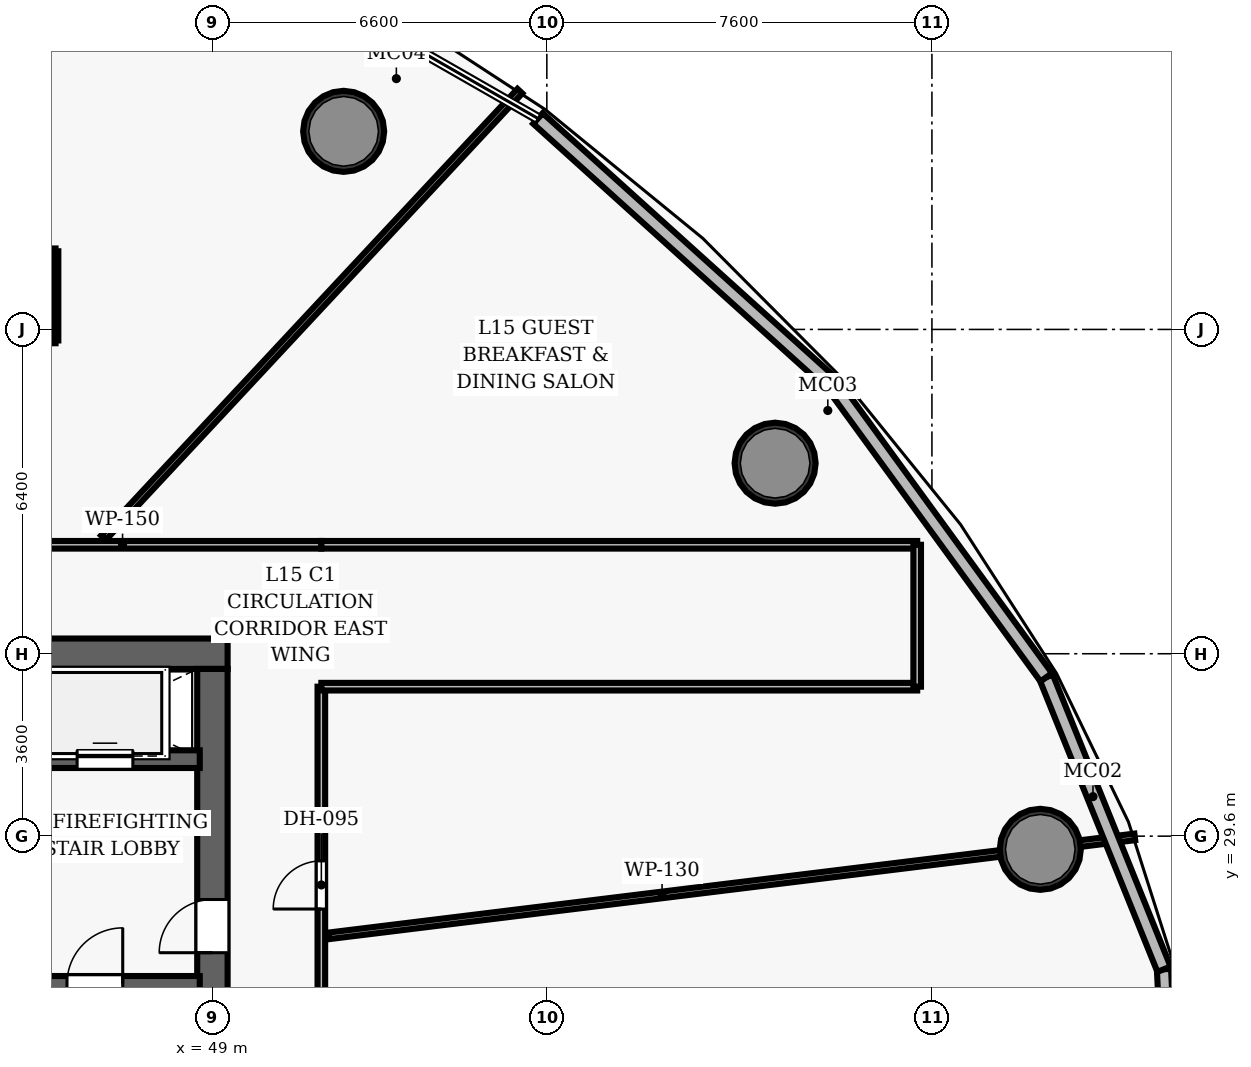
"""IFC4 building model, lengths in metres.
Left out: names, types, materials, properties, quantities, classifications, styles, units other than length and angle.
Written with IfcOpenShell. Run it as: python <this file> out.ifc"""

import sys

from ifc_helpers import new_model, si_unit, direction, frame, frame_2d, origin, origin_2d, place, context, subcontext, project, spatial, rectangle, hollow_circle, extrude, element, fill, save


model = new_model("IFC4")
c1 = context("Model", 3, precision=1e-05, world=origin(), true_north=direction((0.0, 1.0)))
c2 = subcontext(c1, "Body", "Model", "MODEL_VIEW")
j1 = project(units=[si_unit("LENGTHUNIT", "METRE"), si_unit("PLANEANGLEUNIT", "RADIAN")], contexts=[c1])
p1 = place(None, origin())
s1 = spatial("IfcSite", under=j1, at=p1, CompositionType="ELEMENT")
p2 = place(p1, origin())
s2 = spatial("IfcBuilding", under=s1, at=p2, CompositionType="ELEMENT")
p3 = place(p2, frame((0.0, 0.0, 69.4)))
s3 = spatial("IfcBuildingStorey", under=s2, at=p3, CompositionType="ELEMENT", Elevation=69.4)
p4 = place(p3, frame((26.7, 33.2, 0.0), z_axis=(0.0, 0.0, 1.0), x_axis=(1.0, 0.0, 0.0)))
e1 = element("IfcWall", 1, at=p4, inside=s3, PredefinedType="SHEAR", context=c2, shape_type="SweptSolid", body=[
    extrude(rectangle(XDim=22.6, YDim=0.6, at=frame_2d((11.3, 0.0))), origin(), (0.0, 0.0, 1.0), 3.5),
])
p5 = place(p4, frame((4.62, 0.0, 0.0)))
e2 = element("IfcOpeningElement", 2, at=p5, cuts=e1, PredefinedType="OPENING", context=c2, shape_type="SweptSolid", body=[
    extrude(rectangle(XDim=1.05, YDim=2.15, at=frame_2d((0.525, 1.075))), frame((0.0, 0.31, 0.0), z_axis=(0.0, -1.0, 0.0), x_axis=(1.0, 0.0, 0.0)), (0.0, 0.0, 1.0), 0.62),
])
p6 = place(p4, frame((14.52, 0.0, 0.0)))
e3 = element("IfcOpeningElement", 3, at=p6, cuts=e1, PredefinedType="OPENING", context=c2, shape_type="SweptSolid", body=[
    extrude(rectangle(XDim=1.05, YDim=2.15, at=frame_2d((0.525, 1.075))), frame((0.0, 0.31, 0.0), z_axis=(0.0, -1.0, 0.0), x_axis=(1.0, 0.0, 0.0)), (0.0, 0.0, 1.0), 0.62),
])
p7 = place(p3, frame((49.0, 19.1, 0.0), z_axis=(0.0, 0.0, 1.0), x_axis=(0.0, 1.0, 0.0)))
e4 = element("IfcWall", 4, at=p7, inside=s3, PredefinedType="SHEAR", context=c2, shape_type="SweptSolid", body=[
    extrude(rectangle(XDim=13.8, YDim=0.6, at=frame_2d((6.9, 0.0))), origin(), (0.0, 0.0, 1.0), 3.5),
])
p8 = place(p7, frame((8.2, 0.0, 0.0)))
e5 = element("IfcOpeningElement", 5, at=p8, cuts=e4, PredefinedType="OPENING", context=c2, shape_type="SweptSolid", body=[
    extrude(rectangle(XDim=1.05, YDim=2.15, at=frame_2d((0.525, 1.075))), frame((0.0, 0.31, 0.0), z_axis=(0.0, -1.0, 0.0), x_axis=(1.0, 0.0, 0.0)), (0.0, 0.0, 1.0), 0.62),
])
for number, where, z_axis, x_axis in (
    (6, (65.339, 29.34, 0.0), (0.0, 0.0, 1.0), (1.0, 0.0, 0.0)),
    (7, (60.105, 36.96, 0.0), (0.0, 0.0, 1.0), (1.0, 0.0, 0.0)),
    (8, (51.59, 43.509, 0.0), (0.0, 0.0, 1.0), (1.0, 0.0, 0.0)),
):
    element("IfcColumn", number, at=place(p3, frame(where, z_axis=z_axis, x_axis=x_axis)), inside=s3, PredefinedType="COLUMN", context=c2, shape_type="SweptSolid", body=[
        extrude(hollow_circle(Radius=0.8, WallThickness=0.06, at=origin_2d()), origin(), (0.0, 0.0, 1.0), 3.5),
    ])
p9 = place(p3, frame((45.08, 26.69, 0.0), z_axis=(0.0, 0.0, 1.0), x_axis=(1.0, 0.0, 0.0)))
e9 = element("IfcWall", 9, at=p9, inside=s3, PredefinedType="SHEAR", context=c2, shape_type="SweptSolid", body=[
    extrude(rectangle(XDim=3.67, YDim=0.3, at=frame_2d((1.835, 0.0))), origin(), (0.0, 0.0, 1.0), 3.5),
])
p10 = place(p9, frame((1.05, 0.0, 0.0)))
e10 = element("IfcOpeningElement", 10, at=p10, cuts=e9, PredefinedType="OPENING", context=c2, shape_type="SweptSolid", body=[
    extrude(rectangle(XDim=1.1, YDim=2.15, at=frame_2d((0.55, 1.075))), frame((0.0, 0.16, 0.0), z_axis=(0.0, -1.0, 0.0), x_axis=(1.0, 0.0, 0.0)), (0.0, 0.0, 1.0), 0.32),
])
p11 = place(p3, frame((45.08, 31.12, 0.0), z_axis=(0.0, 0.0, 1.0), x_axis=(1.0, 0.0, 0.0)))
e11 = element("IfcWall", 11, at=p11, inside=s3, PredefinedType="SHEAR", context=c2, shape_type="SweptSolid", body=[
    extrude(rectangle(XDim=3.67, YDim=0.35, at=frame_2d((1.835, 0.0))), origin(), (0.0, 0.0, 1.0), 2.6),
])
p12 = place(p11, frame((1.25, 0.0, 0.0)))
e12 = element("IfcOpeningElement", 12, at=p12, cuts=e11, PredefinedType="OPENING", context=c2, shape_type="SweptSolid", body=[
    extrude(rectangle(XDim=1.1, YDim=2.15, at=frame_2d((0.55, 1.075))), frame((0.0, 0.185, 0.0), z_axis=(0.0, -1.0, 0.0), x_axis=(1.0, 0.0, 0.0)), (0.0, 0.0, 1.0), 0.37),
])
p13 = place(p3, frame((27.65, 35.35, 0.0), z_axis=(0.0, 0.0, 1.0), x_axis=(1.0, 0.0, 0.0)))
e13 = element("IfcWall", 13, at=p13, inside=s3, PredefinedType="PARTITIONING", context=c2, shape_type="SweptSolid", body=[
    extrude(rectangle(XDim=23.5, YDim=0.15, at=frame_2d((11.75, 0.0))), origin(), (0.0, 0.0, 1.0), 2.6),
])
p14 = place(p13, frame((14.553, 0.0, 0.0)))
e14 = element("IfcOpeningElement", 14, at=p14, cuts=e13, PredefinedType="OPENING", context=c2, shape_type="SweptSolid", body=[
    extrude(rectangle(XDim=0.95, YDim=2.15, at=frame_2d((0.475, 1.075))), frame((0.0, 0.085, 0.0), z_axis=(0.0, -1.0, 0.0), x_axis=(1.0, 0.0, 0.0)), (0.0, 0.0, 1.0), 0.17),
])
p15 = place(p13, frame((7.784, 0.0, 0.0)))
e15 = element("IfcOpeningElement", 15, at=p15, cuts=e13, PredefinedType="OPENING", context=c2, shape_type="SweptSolid", body=[
    extrude(rectangle(XDim=0.95, YDim=2.15, at=frame_2d((0.475, 1.075))), frame((0.0, 0.085, 0.0), z_axis=(0.0, -1.0, 0.0), x_axis=(1.0, 0.0, 0.0)), (0.0, 0.0, 1.0), 0.17),
])
p16 = place(p3, frame((51.15, 16.65, 0.0), z_axis=(0.0, 0.0, 1.0), x_axis=(0.0, 1.0, 0.0)))
e16 = element("IfcWall", 16, at=p16, inside=s3, PredefinedType="PARTITIONING", context=c2, shape_type="SweptSolid", body=[
    extrude(rectangle(XDim=15.9, YDim=0.15, at=frame_2d((7.95, 0.0))), origin(), (0.0, 0.0, 1.0), 2.6),
])
p17 = place(p16, frame((11.512, 0.0, 0.0)))
e17 = element("IfcOpeningElement", 17, at=p17, cuts=e16, PredefinedType="OPENING", context=c2, shape_type="SweptSolid", body=[
    extrude(rectangle(XDim=0.95, YDim=2.15, at=frame_2d((0.475, 1.075))), frame((0.0, 0.085, 0.0), z_axis=(0.0, -1.0, 0.0), x_axis=(1.0, 0.0, 0.0)), (0.0, 0.0, 1.0), 0.17),
])
p18 = place(p16, frame((7.004, 0.0, 0.0)))
e18 = element("IfcOpeningElement", 18, at=p18, cuts=e16, PredefinedType="OPENING", context=c2, shape_type="SweptSolid", body=[
    extrude(rectangle(XDim=0.95, YDim=2.15, at=frame_2d((0.475, 1.075))), frame((0.0, 0.085, 0.0), z_axis=(0.0, -1.0, 0.0), x_axis=(1.0, 0.0, 0.0)), (0.0, 0.0, 1.0), 0.17),
])
for number, where, z_axis, x_axis in (
    (19, (51.15, 35.35, 0.0), (0.0, 0.0, 1.0), (1.0, 0.0, 0.0)),
    (20, (51.15, 32.55, 0.0), (0.0, 0.0, 1.0), (1.0, 0.0, 0.0)),
):
    element("IfcWall", number, at=place(p3, frame(where, z_axis=z_axis, x_axis=x_axis)), inside=s3, PredefinedType="PARTITIONING", context=c2, shape_type="SweptSolid", body=[
        extrude(rectangle(XDim=11.759, YDim=0.15, at=frame_2d((5.88, 0.0))), origin(), (0.0, 0.0, 1.0), 2.6),
    ])
p19 = place(p3, frame((62.909, 32.55, 0.0), z_axis=(0.0, 0.0, 1.0), x_axis=(0.0, 1.0, 0.0)))
e21 = element("IfcWall", 21, at=p19, inside=s3, PredefinedType="PARTITIONING", context=c2, shape_type="SweptSolid", body=[
    extrude(rectangle(XDim=2.8, YDim=0.15, at=frame_2d((1.4, 0.0))), origin(), (0.0, 0.0, 1.0), 2.6),
])
p20 = place(p3, frame((51.29, 27.632, 0.0), z_axis=(0.0, 0.0, 1.0), x_axis=(0.992547009995, 0.121862352469, 0.0)))
e22 = element("IfcWall", 22, at=p20, inside=s3, PredefinedType="PARTITIONING", context=c2, shape_type="SweptSolid", body=[
    extrude(rectangle(XDim=16.033, YDim=0.13, at=frame_2d((8.017, 0.0))), origin(), (0.0, 0.0, 1.0), 2.6),
])
p21 = place(p3, frame((46.85, 35.49, 0.0), z_axis=(0.0, 0.0, 1.0), x_axis=(0.681999123192, 0.731352989988, 0.0)))
e23 = element("IfcWall", 23, at=p21, inside=s3, PredefinedType="PARTITIONING", context=c2, shape_type="SweptSolid", body=[
    extrude(rectangle(XDim=12.05, YDim=0.13, at=frame_2d((6.025, 0.0))), origin(), (0.0, 0.0, 1.0), 2.6),
])
p22 = place(p3, frame((43.704, 39.382, 0.0), z_axis=(0.0, 0.0, 1.0), x_axis=(1.0, 0.0, 0.0)))
e24 = element("IfcWall", 24, at=p22, inside=s3, PredefinedType="PARTITIONING", context=c2, shape_type="SweptSolid", body=[
    extrude(rectangle(XDim=2.2, YDim=0.11, at=frame_2d((1.1, 0.0))), origin(), (0.0, 0.0, 1.0), 2.6),
])
p23 = place(p3, frame((43.704, 41.142, 0.0), z_axis=(0.0, 0.0, 1.0), x_axis=(1.0, 0.0, 0.0)))
e25 = element("IfcWall", 25, at=p23, inside=s3, PredefinedType="PARTITIONING", context=c2, shape_type="SweptSolid", body=[
    extrude(rectangle(XDim=2.2, YDim=0.11, at=frame_2d((1.1, 0.0))), origin(), (0.0, 0.0, 1.0), 2.6),
])
p24 = place(p23, frame((0.68, 0.0, 0.0)))
e26 = element("IfcOpeningElement", 26, at=p24, cuts=e25, PredefinedType="OPENING", context=c2, shape_type="SweptSolid", body=[
    extrude(rectangle(XDim=0.85, YDim=2.1, at=frame_2d((0.425, 1.05))), frame((0.0, 0.065, 0.0), z_axis=(0.0, -1.0, 0.0), x_axis=(1.0, 0.0, 0.0)), (0.0, 0.0, 1.0), 0.13),
])
p25 = place(p3, frame((45.904, 39.382, 0.0), z_axis=(0.0, 0.0, 1.0), x_axis=(0.0, 1.0, 0.0)))
e27 = element("IfcWall", 27, at=p25, inside=s3, PredefinedType="PARTITIONING", context=c2, shape_type="SweptSolid", body=[
    extrude(rectangle(XDim=1.76, YDim=0.11, at=frame_2d((0.88, 0.0))), origin(), (0.0, 0.0, 1.0), 2.6),
])
p26 = place(p3, frame((67.78, 26.975, 0.0), z_axis=(0.0, 0.0, 1.0), x_axis=(0.047784583266, -0.998857664336, 0.0)))
e28 = element("IfcWall", 28, at=p26, inside=s3, PredefinedType="SOLIDWALL", context=c2, shape_type="SweptSolid", body=[
    extrude(rectangle(XDim=5.498, YDim=0.28, at=frame_2d((2.749, 0.0))), origin(), (0.0, 0.0, 1.0), 3.25),
])
p27 = place(p3, frame((65.456, 32.735, 0.0), z_axis=(0.0, 0.0, 1.0), x_axis=(0.374153712501, -0.9273667017, 0.0)))
e29 = element("IfcWall", 29, at=p27, inside=s3, PredefinedType="SOLIDWALL", context=c2, shape_type="SweptSolid", body=[
    extrude(rectangle(XDim=6.212, YDim=0.28, at=frame_2d((3.106, 0.0))), origin(), (0.0, 0.0, 1.0), 3.25),
])
p28 = place(p3, frame((61.248, 38.508, 0.0), z_axis=(0.0, 0.0, 1.0), x_axis=(0.589006644753, -0.808128190596, 0.0)))
e30 = element("IfcWall", 30, at=p28, inside=s3, PredefinedType="SOLIDWALL", context=c2, shape_type="SweptSolid", body=[
    extrude(rectangle(XDim=7.143, YDim=0.28, at=frame_2d((3.572, 0.0))), origin(), (0.0, 0.0, 1.0), 3.25),
])
p29 = place(p3, frame((55.425, 43.764, 0.0), z_axis=(0.0, 0.0, 1.0), x_axis=(0.742358761102, -0.670002589409, 0.0)))
e31 = element("IfcWall", 31, at=p29, inside=s3, PredefinedType="SOLIDWALL", context=c2, shape_type="SweptSolid", body=[
    extrude(rectangle(XDim=7.845, YDim=0.28, at=frame_2d((3.922, 0.0))), origin(), (0.0, 0.0, 1.0), 3.25),
])
p30 = place(p10, origin())
e32 = element("IfcDoor", 32, at=p30, inside=s3, OperationType="SINGLE_SWING_RIGHT", PredefinedType="DOOR", context=c2, shape_type="SweptSolid", body=[
    extrude(rectangle(XDim=1.1, YDim=2.15, at=frame_2d((0.55, 1.075))), frame((0.0, 0.025, 0.0), z_axis=(0.0, -1.0, 0.0), x_axis=(1.0, 0.0, 0.0)), (0.0, 0.0, 1.0), 0.05),
])
fill(e10, e32)
p31 = place(p8, origin())
e33 = element("IfcDoor", 33, at=p31, inside=s3, OperationType="SINGLE_SWING_LEFT", PredefinedType="DOOR", context=c2, shape_type="SweptSolid", body=[
    extrude(rectangle(XDim=1.05, YDim=2.15, at=frame_2d((0.525, 1.075))), frame((0.0, 0.025, 0.0), z_axis=(0.0, -1.0, 0.0), x_axis=(1.0, 0.0, 0.0)), (0.0, 0.0, 1.0), 0.05),
])
fill(e5, e33)
p32 = place(p17, origin())
e34 = element("IfcDoor", 34, at=p32, inside=s3, OperationType="SINGLE_SWING_LEFT", PredefinedType="DOOR", context=c2, shape_type="SweptSolid", body=[
    extrude(rectangle(XDim=0.95, YDim=2.15, at=frame_2d((0.475, 1.075))), frame((0.0, 0.025, 0.0), z_axis=(0.0, -1.0, 0.0), x_axis=(1.0, 0.0, 0.0)), (0.0, 0.0, 1.0), 0.05),
])
fill(e17, e34)
p33 = place(p12, origin())
e35 = element("IfcDoor", 35, at=p33, inside=s3, OperationType="SLIDING_TO_LEFT", PredefinedType="DOOR", context=c2, shape_type="SweptSolid", body=[
    extrude(rectangle(XDim=1.1, YDim=2.15, at=frame_2d((0.55, 1.075))), frame((0.0, 0.025, 0.0), z_axis=(0.0, -1.0, 0.0), x_axis=(1.0, 0.0, 0.0)), (0.0, 0.0, 1.0), 0.05),
])
fill(e12, e35)
save(model, sys.argv[1])
